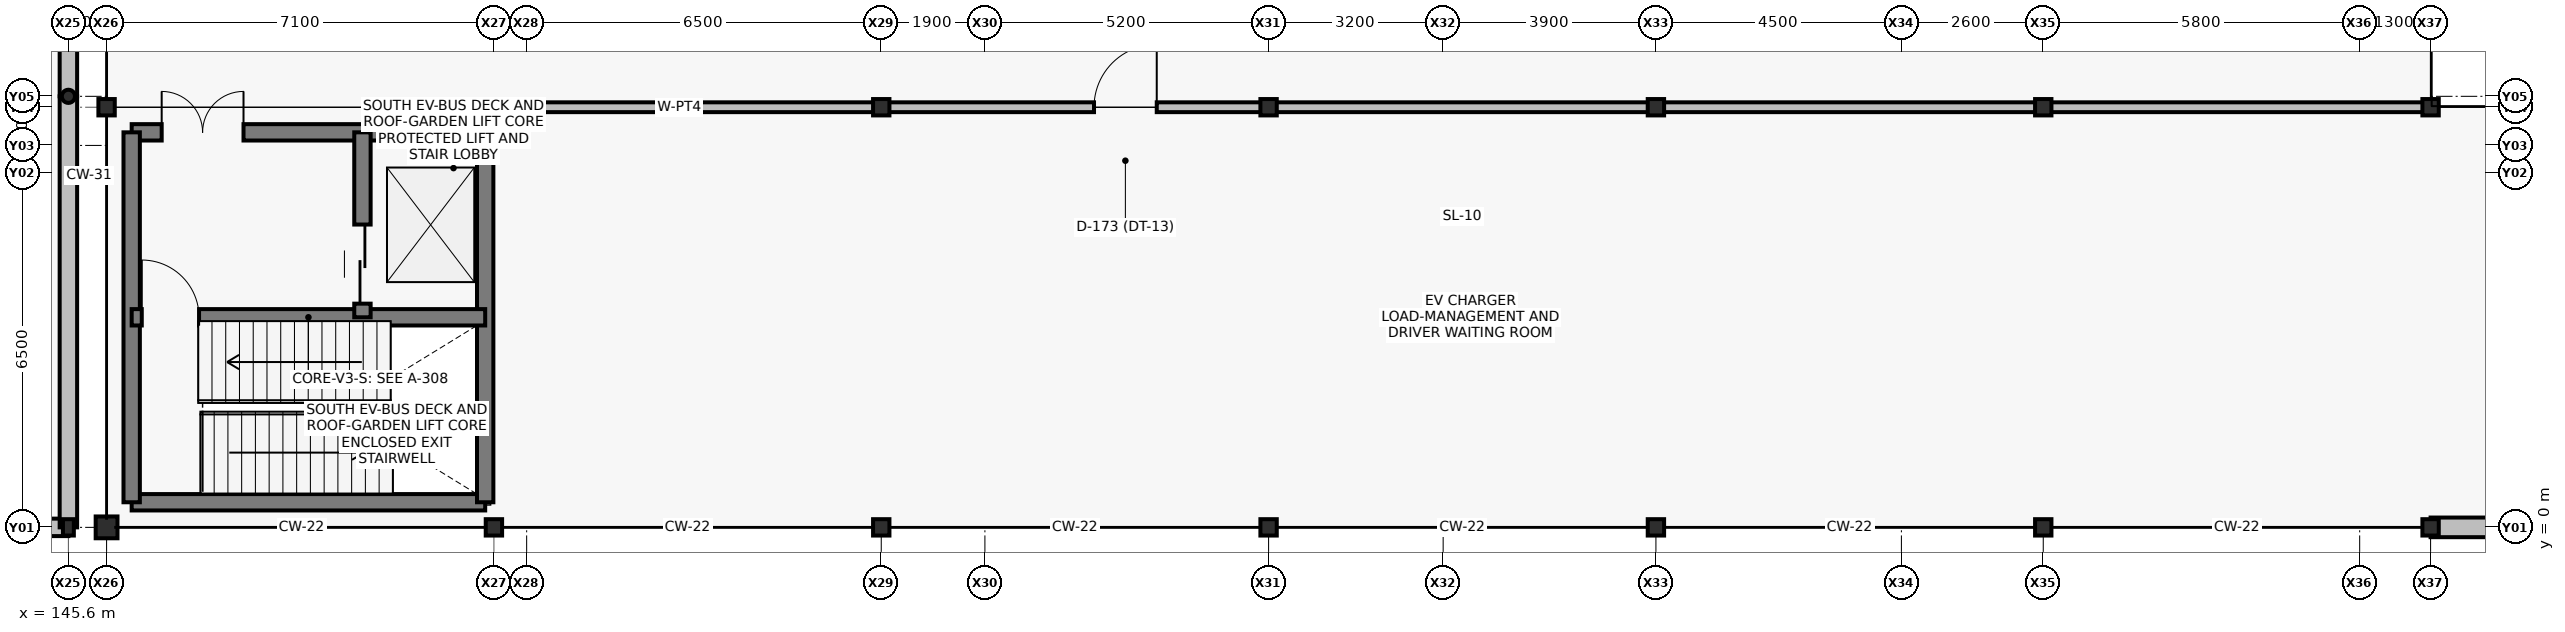
"""IFC4 building model, lengths in metres.
Left out: names, types, materials, properties, quantities, classifications, styles, units other than length and angle.
Written with IfcOpenShell. Run it as: python <this file> out.ifc"""

import sys

from ifc_helpers import new_model, si_unit, direction, frame, frame_2d, origin, origin_2d, place, context, subcontext, project, spatial, rectangle, hollow_rectangle, hollow_circle, i_section, extrude, element, fill, save


model = new_model("IFC4")
c1 = context("Model", 3, precision=1e-05, world=origin(), true_north=direction((0.0, 1.0)))
c2 = subcontext(c1, "Body", "Model", "MODEL_VIEW")
j1 = project(units=[si_unit("LENGTHUNIT", "METRE"), si_unit("PLANEANGLEUNIT", "RADIAN")], contexts=[c1])
p1 = place(None, origin())
s1 = spatial("IfcSite", under=j1, at=p1, CompositionType="ELEMENT")
p2 = place(p1, origin())
s2 = spatial("IfcBuilding", under=s1, at=p2, CompositionType="ELEMENT")
p3 = place(p2, frame((0.0, 0.0, 6.0)))
s3 = spatial("IfcBuildingStorey", under=s2, at=p3, CompositionType="ELEMENT", Elevation=6.0)
p4 = place(p3, frame((146.3, 0.0, 0.0), z_axis=(0.0, 0.0, 1.0), x_axis=(1.0, 0.0, 0.0)))
e1 = element("IfcColumn", 1, at=p4, inside=s3, PredefinedType="COLUMN", context=c2, shape_type="SweptSolid", body=[
    extrude(hollow_rectangle(XDim=0.4, YDim=0.4, WallThickness=0.016, at=origin_2d()), origin(), (0.0, 0.0, 1.0), 5.1),
])
p5 = place(p3, frame((146.3, 7.7, 0.0), z_axis=(0.0, 0.0, 1.0), x_axis=(1.0, 0.0, 0.0)))
e2 = element("IfcColumn", 2, at=p5, inside=s3, PredefinedType="COLUMN", context=c2, shape_type="SweptSolid", body=[
    extrude(i_section(OverallWidth=0.3, OverallDepth=0.3, WebThickness=0.01, FlangeThickness=0.015, at=origin_2d()), origin(), (0.0, 0.0, 1.0), 5.1),
])
for number, where, z_axis, x_axis in (
    (3, (153.4, 0.0, 0.0), (0.0, 0.0, 1.0), (1.0, 0.0, 0.0)),
    (4, (160.5, 0.0, 0.0), (0.0, 0.0, 1.0), (1.0, 0.0, 0.0)),
):
    element("IfcColumn", number, at=place(p3, frame(where, z_axis=z_axis, x_axis=x_axis)), inside=s3, PredefinedType="COLUMN", context=c2, shape_type="SweptSolid", body=[
        extrude(hollow_rectangle(XDim=0.3, YDim=0.3, WallThickness=0.012, at=origin_2d()), origin(), (0.0, 0.0, 1.0), 5.1),
    ])
p6 = place(p3, frame((160.5, 7.7, 0.0), z_axis=(0.0, 0.0, 1.0), x_axis=(1.0, 0.0, 0.0)))
e5 = element("IfcColumn", 5, at=p6, inside=s3, PredefinedType="COLUMN", context=c2, shape_type="SweptSolid", body=[
    extrude(i_section(OverallWidth=0.3, OverallDepth=0.3, WebThickness=0.01, FlangeThickness=0.015, at=origin_2d()), origin(), (0.0, 0.0, 1.0), 5.1),
])
p7 = place(p3, frame((167.6, 0.0, 0.0), z_axis=(0.0, 0.0, 1.0), x_axis=(1.0, 0.0, 0.0)))
e6 = element("IfcColumn", 6, at=p7, inside=s3, PredefinedType="COLUMN", context=c2, shape_type="SweptSolid", body=[
    extrude(hollow_rectangle(XDim=0.3, YDim=0.3, WallThickness=0.012, at=origin_2d()), origin(), (0.0, 0.0, 1.0), 5.1),
])
p8 = place(p3, frame((167.6, 7.7, 0.0), z_axis=(0.0, 0.0, 1.0), x_axis=(1.0, 0.0, 0.0)))
e7 = element("IfcColumn", 7, at=p8, inside=s3, PredefinedType="COLUMN", context=c2, shape_type="SweptSolid", body=[
    extrude(i_section(OverallWidth=0.3, OverallDepth=0.3, WebThickness=0.01, FlangeThickness=0.015, at=origin_2d()), origin(), (0.0, 0.0, 1.0), 5.1),
])
p9 = place(p3, frame((174.7, 0.0, 0.0), z_axis=(0.0, 0.0, 1.0), x_axis=(1.0, 0.0, 0.0)))
e8 = element("IfcColumn", 8, at=p9, inside=s3, PredefinedType="COLUMN", context=c2, shape_type="SweptSolid", body=[
    extrude(hollow_rectangle(XDim=0.3, YDim=0.3, WallThickness=0.012, at=origin_2d()), origin(), (0.0, 0.0, 1.0), 5.1),
])
p10 = place(p3, frame((174.7, 7.7, 0.0), z_axis=(0.0, 0.0, 1.0), x_axis=(1.0, 0.0, 0.0)))
e9 = element("IfcColumn", 9, at=p10, inside=s3, PredefinedType="COLUMN", context=c2, shape_type="SweptSolid", body=[
    extrude(i_section(OverallWidth=0.3, OverallDepth=0.3, WebThickness=0.01, FlangeThickness=0.015, at=origin_2d()), origin(), (0.0, 0.0, 1.0), 5.1),
])
p11 = place(p3, frame((181.8, 0.0, 0.0), z_axis=(0.0, 0.0, 1.0), x_axis=(1.0, 0.0, 0.0)))
e10 = element("IfcColumn", 10, at=p11, inside=s3, PredefinedType="COLUMN", context=c2, shape_type="SweptSolid", body=[
    extrude(hollow_rectangle(XDim=0.3, YDim=0.3, WallThickness=0.012, at=origin_2d()), origin(), (0.0, 0.0, 1.0), 5.1),
])
p12 = place(p3, frame((181.8, 7.7, 0.0), z_axis=(0.0, 0.0, 1.0), x_axis=(1.0, 0.0, 0.0)))
e11 = element("IfcColumn", 11, at=p12, inside=s3, PredefinedType="COLUMN", context=c2, shape_type="SweptSolid", body=[
    extrude(i_section(OverallWidth=0.3, OverallDepth=0.3, WebThickness=0.01, FlangeThickness=0.015, at=origin_2d()), origin(), (0.0, 0.0, 1.0), 5.1),
])
p13 = place(p3, frame((188.9, 0.0, 0.0), z_axis=(0.0, 0.0, 1.0), x_axis=(1.0, 0.0, 0.0)))
e12 = element("IfcColumn", 12, at=p13, inside=s3, PredefinedType="COLUMN", context=c2, shape_type="SweptSolid", body=[
    extrude(hollow_rectangle(XDim=0.3, YDim=0.3, WallThickness=0.012, at=origin_2d()), origin(), (0.0, 0.0, 1.0), 5.1),
])
p14 = place(p3, frame((188.9, 7.7, 0.0), z_axis=(0.0, 0.0, 1.0), x_axis=(1.0, 0.0, 0.0)))
e13 = element("IfcColumn", 13, at=p14, inside=s3, PredefinedType="COLUMN", context=c2, shape_type="SweptSolid", body=[
    extrude(i_section(OverallWidth=0.3, OverallDepth=0.3, WebThickness=0.01, FlangeThickness=0.015, at=origin_2d()), origin(), (0.0, 0.0, 1.0), 5.1),
])
p15 = place(p3, frame((145.6, 0.0, 0.0), z_axis=(0.0, 0.0, 1.0), x_axis=(1.0, 0.0, 0.0)))
e14 = element("IfcColumn", 14, at=p15, inside=s3, PredefinedType="COLUMN", context=c2, shape_type="SweptSolid", body=[
    extrude(hollow_rectangle(XDim=0.2, YDim=0.3, WallThickness=0.009, at=origin_2d()), origin(), (0.0, 0.0, 1.0), 3.1),
])
p16 = place(p3, frame((145.6, 7.9, 0.0), z_axis=(0.0, 0.0, 1.0), x_axis=(1.0, 0.0, 0.0)))
e15 = element("IfcColumn", 15, at=p16, inside=s3, PredefinedType="COLUMN", context=c2, shape_type="SweptSolid", body=[
    extrude(hollow_circle(Radius=0.121, WallThickness=0.009, at=origin_2d()), origin(), (0.0, 0.0, 1.0), 2.9),
])
p17 = place(p3, frame((188.9, 0.0, 0.0), z_axis=(0.0, 0.0, 1.0), x_axis=(1.0, 0.0, 0.0)))
e16 = element("IfcWall", 16, at=p17, inside=s3, PredefinedType="SOLIDWALL", context=c2, shape_type="SweptSolid", body=[
    extrude(rectangle(XDim=7.1, YDim=0.36, at=frame_2d((3.55, 0.0))), origin(), (0.0, 0.0, 1.0), 4.14),
])
p18 = place(p17, frame((2.4, 0.0, 1.0)))
e17 = element("IfcOpeningElement", 17, at=p18, cuts=e16, PredefinedType="OPENING", context=c2, shape_type="SweptSolid", body=[
    extrude(rectangle(XDim=1.15, YDim=1.45, at=frame_2d((0.575, 0.725))), frame((0.0, 0.19, 0.0), z_axis=(0.0, -1.0, 0.0), x_axis=(1.0, 0.0, 0.0)), (0.0, 0.0, 1.0), 0.38),
])
p19 = place(p3, frame((138.6, 0.0, 0.0), z_axis=(0.0, 0.0, 1.0), x_axis=(1.0, 0.0, 0.0)))
e18 = element("IfcWall", 18, at=p19, inside=s3, PredefinedType="SOLIDWALL", context=c2, shape_type="SweptSolid", body=[
    extrude(rectangle(XDim=7.0, YDim=0.32, at=frame_2d((3.5, 0.0))), origin(), (0.0, 0.0, 1.0), 2.38),
])
p20 = place(p19, frame((2.4, 0.0, 0.6)))
e19 = element("IfcOpeningElement", 19, at=p20, cuts=e18, PredefinedType="OPENING", context=c2, shape_type="SweptSolid", body=[
    extrude(rectangle(XDim=1.35, YDim=1.65, at=frame_2d((0.675, 0.825))), frame((0.0, 0.17, 0.0), z_axis=(0.0, -1.0, 0.0), x_axis=(1.0, 0.0, 0.0)), (0.0, 0.0, 1.0), 0.34),
])
for number, where, z_axis, x_axis in (
    (20, (145.6, 0.0, 0.0), (0.0, 0.0, 1.0), (0.0, 1.0, 0.0)),
    (21, (145.6, 7.9, 0.0), (0.0, 0.0, 1.0), (0.0, 1.0, 0.0)),
):
    element("IfcWall", number, at=place(p3, frame(where, z_axis=z_axis, x_axis=x_axis)), inside=s3, PredefinedType="SOLIDWALL", context=c2, shape_type="SweptSolid", body=[
        extrude(rectangle(XDim=7.9, YDim=0.32, at=frame_2d((3.95, 0.0))), origin(), (0.0, 0.0, 1.0), 2.38),
    ])
p21 = place(p3, frame((146.76, 0.46, 0.0), z_axis=(0.0, 0.0, 1.0), x_axis=(1.0, 0.0, 0.0)))
e22 = element("IfcWall", 22, at=p21, inside=s3, PredefinedType="SHEAR", context=c2, shape_type="SweptSolid", body=[
    extrude(rectangle(XDim=6.48, YDim=0.3, at=frame_2d((3.24, 0.0))), origin(), (0.0, 0.0, 1.0), 4.82),
])
p22 = place(p3, frame((146.76, 7.24, 0.0), z_axis=(0.0, 0.0, 1.0), x_axis=(1.0, 0.0, 0.0)))
e23 = element("IfcWall", 23, at=p22, inside=s3, PredefinedType="SHEAR", context=c2, shape_type="SweptSolid", body=[
    extrude(rectangle(XDim=6.48, YDim=0.3, at=frame_2d((3.24, 0.0))), origin(), (0.0, 0.0, 1.0), 4.82),
])
p23 = place(p22, frame((0.55, 0.0, 0.0)))
e24 = element("IfcOpeningElement", 24, at=p23, cuts=e23, PredefinedType="OPENING", context=c2, shape_type="SweptSolid", body=[
    extrude(rectangle(XDim=1.5, YDim=2.2, at=frame_2d((0.75, 1.1))), frame((0.0, 0.16, 0.0), z_axis=(0.0, -1.0, 0.0), x_axis=(1.0, 0.0, 0.0)), (0.0, 0.0, 1.0), 0.32),
])
for number, where, z_axis, x_axis in (
    (25, (146.76, 0.46, 0.0), (0.0, 0.0, 1.0), (0.0, 1.0, 0.0)),
    (26, (153.24, 0.46, 0.0), (0.0, 0.0, 1.0), (0.0, 1.0, 0.0)),
):
    element("IfcWall", number, at=place(p3, frame(where, z_axis=z_axis, x_axis=x_axis)), inside=s3, PredefinedType="SHEAR", context=c2, shape_type="SweptSolid", body=[
        extrude(rectangle(XDim=6.78, YDim=0.3, at=frame_2d((3.39, 0.0))), origin(), (0.0, 0.0, 1.0), 4.82),
    ])
p24 = place(p3, frame((146.76, 3.85, 0.0), z_axis=(0.0, 0.0, 1.0), x_axis=(1.0, 0.0, 0.0)))
e27 = element("IfcWall", 27, at=p24, inside=s3, PredefinedType="SHEAR", context=c2, shape_type="SweptSolid", body=[
    extrude(rectangle(XDim=6.48, YDim=0.3, at=frame_2d((3.24, 0.0))), origin(), (0.0, 0.0, 1.0), 4.82),
])
p25 = place(p24, frame((0.185, 0.0, 0.0)))
e28 = element("IfcOpeningElement", 28, at=p25, cuts=e27, PredefinedType="OPENING", context=c2, shape_type="SweptSolid", body=[
    extrude(rectangle(XDim=1.05, YDim=2.15, at=frame_2d((0.525, 1.075))), frame((0.0, 0.16, 0.0), z_axis=(0.0, -1.0, 0.0), x_axis=(1.0, 0.0, 0.0)), (0.0, 0.0, 1.0), 0.32),
])
p26 = place(p3, frame((150.99, 3.85, 0.0), z_axis=(0.0, 0.0, 1.0), x_axis=(0.0, 1.0, 0.0)))
e29 = element("IfcWall", 29, at=p26, inside=s3, PredefinedType="SHEAR", context=c2, shape_type="SweptSolid", body=[
    extrude(rectangle(XDim=3.39, YDim=0.3, at=frame_2d((1.695, 0.0))), origin(), (0.0, 0.0, 1.0), 4.82),
])
p27 = place(p26, frame((0.25, 0.0, 0.0)))
e30 = element("IfcOpeningElement", 30, at=p27, cuts=e29, PredefinedType="OPENING", context=c2, shape_type="SweptSolid", body=[
    extrude(rectangle(XDim=1.45, YDim=2.25, at=frame_2d((0.725, 1.125))), frame((0.0, 0.16, 0.0), z_axis=(0.0, -1.0, 0.0), x_axis=(1.0, 0.0, 0.0)), (0.0, 0.0, 1.0), 0.32),
])
p28 = place(p3, frame((153.4, 7.7, 0.0), z_axis=(0.0, 0.0, 1.0), x_axis=(1.0, 0.0, 0.0)))
e31 = element("IfcWall", 31, at=p28, inside=s3, PredefinedType="PARTITIONING", context=c2, shape_type="SweptSolid", body=[
    extrude(rectangle(XDim=35.5, YDim=0.18, at=frame_2d((17.75, 0.0))), origin(), (0.0, 0.0, 1.0), 4.05),
])
p29 = place(p28, frame((11.0, 0.0, 0.0)))
e32 = element("IfcOpeningElement", 32, at=p29, cuts=e31, PredefinedType="OPENING", context=c2, shape_type="SweptSolid", body=[
    extrude(rectangle(XDim=1.15, YDim=2.15, at=frame_2d((0.575, 1.075))), frame((0.0, 0.1, 0.0), z_axis=(0.0, -1.0, 0.0), x_axis=(1.0, 0.0, 0.0)), (0.0, 0.0, 1.0), 0.2),
])
p30 = place(p25, origin())
e33 = element("IfcDoor", 33, at=p30, inside=s3, OperationType="SINGLE_SWING_LEFT", PredefinedType="DOOR", context=c2, shape_type="SweptSolid", body=[
    extrude(rectangle(XDim=1.05, YDim=2.15, at=frame_2d((0.525, 1.075))), frame((0.0, 0.025, 0.0), z_axis=(0.0, -1.0, 0.0), x_axis=(1.0, 0.0, 0.0)), (0.0, 0.0, 1.0), 0.05),
])
fill(e28, e33)
p31 = place(p23, origin())
e34 = element("IfcDoor", 34, at=p31, inside=s3, OperationType="DOUBLE_DOOR_SINGLE_SWING", PredefinedType="DOOR", context=c2, shape_type="SweptSolid", body=[
    extrude(rectangle(XDim=1.5, YDim=2.2, at=frame_2d((0.75, 1.1))), frame((0.0, 0.025, 0.0), z_axis=(0.0, -1.0, 0.0), x_axis=(1.0, 0.0, 0.0)), (0.0, 0.0, 1.0), 0.05),
])
fill(e24, e34)
p32 = place(p27, origin())
e35 = element("IfcDoor", 35, at=p32, inside=s3, OperationType="SLIDING_TO_LEFT", PredefinedType="DOOR", context=c2, shape_type="SweptSolid", body=[
    extrude(rectangle(XDim=1.45, YDim=2.25, at=frame_2d((0.725, 1.125))), frame((0.0, 0.025, 0.0), z_axis=(0.0, -1.0, 0.0), x_axis=(1.0, 0.0, 0.0)), (0.0, 0.0, 1.0), 0.05),
])
fill(e30, e35)
p33 = place(p29, origin())
e36 = element("IfcDoor", 36, at=p33, inside=s3, OperationType="SINGLE_SWING_RIGHT", PredefinedType="DOOR", context=c2, shape_type="SweptSolid", body=[
    extrude(rectangle(XDim=1.15, YDim=2.15, at=frame_2d((0.575, 1.075))), frame((0.0, 0.025, 0.0), z_axis=(0.0, -1.0, 0.0), x_axis=(1.0, 0.0, 0.0)), (0.0, 0.0, 1.0), 0.05),
])
fill(e32, e36)
save(model, sys.argv[1])
